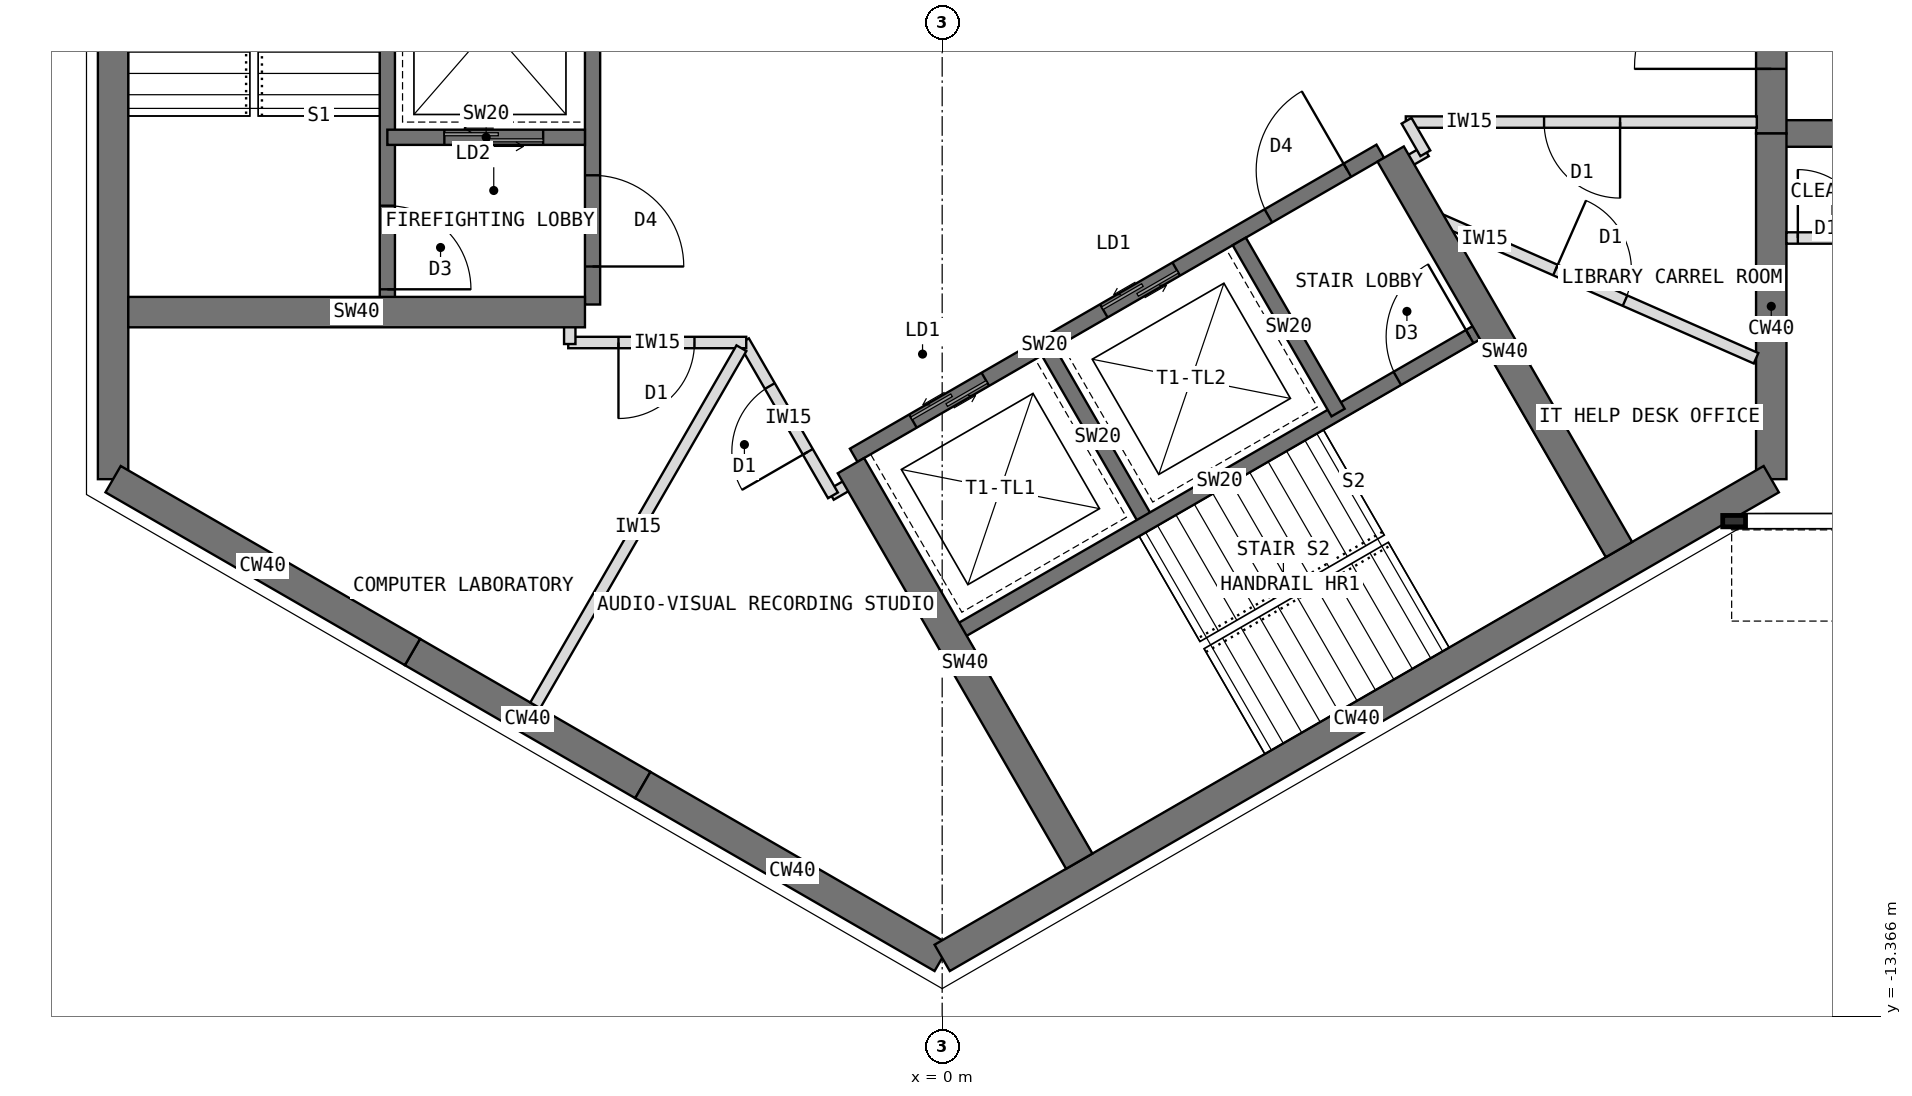
"""IFC4 building model, lengths in metres.
Left out: names, types, materials, properties, quantities, classifications, styles, units other than length and angle.
Written with IfcOpenShell. Run it as: python <this file> out.ifc"""

import sys

from ifc_helpers import new_model, si_unit, direction, frame, frame_2d, origin, place, context, subcontext, project, spatial, rectangle, extrude, element, fill, save


model = new_model("IFC4")
c1 = context("Model", 3, precision=1e-05, world=origin(), true_north=direction((0.0, 1.0)))
c2 = subcontext(c1, "Body", "Model", "MODEL_VIEW")
j1 = project(units=[si_unit("LENGTHUNIT", "METRE"), si_unit("PLANEANGLEUNIT", "RADIAN")], contexts=[c1])
p1 = place(None, origin())
s1 = spatial("IfcSite", under=j1, at=p1, CompositionType="ELEMENT")
p2 = place(p1, origin())
s2 = spatial("IfcBuilding", under=s1, at=p2, CompositionType="ELEMENT")
p3 = place(p2, frame((0.0, 0.0, 255.5)))
s3 = spatial("IfcBuildingStorey", under=s2, at=p3, CompositionType="ELEMENT", Elevation=255.5)
p4 = place(p3, frame((10.908, -6.298, 0.0), z_axis=(0.0, 0.0, 1.0), x_axis=(0.0, 1.0, 0.0)))
e1 = element("IfcWall", 1, at=p4, inside=s3, PredefinedType="SHEAR", context=c2, shape_type="SweptSolid", body=[
    extrude(rectangle(XDim=4.548, YDim=0.4, at=frame_2d((2.274, 0.0))), origin(), (0.0, 0.0, 1.0), 4.0),
])
p5 = place(p3, frame((10.908, -1.75, 0.0), z_axis=(0.0, 0.0, 1.0), x_axis=(0.0, 1.0, 0.0)))
e2 = element("IfcWall", 2, at=p5, inside=s3, PredefinedType="SHEAR", context=c2, shape_type="SweptSolid", body=[
    extrude(rectangle(XDim=3.5, YDim=0.4, at=frame_2d((1.75, 0.0))), origin(), (0.0, 0.0, 1.0), 4.0),
])
p6 = place(p5, frame((0.85, 0.0, 0.0)))
e3 = element("IfcOpeningElement", 3, at=p6, cuts=e2, PredefinedType="OPENING", context=c2, shape_type="SweptSolid", body=[
    extrude(rectangle(XDim=1.8, YDim=2.1, at=frame_2d((0.9, 1.05))), frame((0.0, 0.21, 0.0), z_axis=(0.0, -1.0, 0.0), x_axis=(1.0, 0.0, 0.0)), (0.0, 0.0, 1.0), 0.42),
])
p7 = place(p3, frame((-10.908, 6.298, 0.0), z_axis=(0.0, 0.0, 1.0), x_axis=(0.0, -1.0, 0.0)))
e4 = element("IfcWall", 4, at=p7, inside=s3, PredefinedType="SHEAR", context=c2, shape_type="SweptSolid", body=[
    extrude(rectangle(XDim=12.596, YDim=0.4, at=frame_2d((6.298, 0.0))), origin(), (0.0, 0.0, 1.0), 4.0),
])
p8 = place(p3, frame((-10.908, -6.298, 0.0), z_axis=(0.0, 0.0, 1.0), x_axis=(0.866034513004, -0.499984222037, 0.0)))
e5 = element("IfcWall", 5, at=p8, inside=s3, PredefinedType="SHEAR", context=c2, shape_type="SweptSolid", body=[
    extrude(rectangle(XDim=4.548, YDim=0.4, at=frame_2d((2.274, 0.0))), origin(), (0.0, 0.0, 1.0), 4.0),
])
p9 = place(p3, frame((-6.97, -8.572, 0.0), z_axis=(0.0, 0.0, 1.0), x_axis=(0.866019471182, -0.500010275428, 0.0)))
e6 = element("IfcWall", 6, at=p9, inside=s3, PredefinedType="SHEAR", context=c2, shape_type="SweptSolid", body=[
    extrude(rectangle(XDim=3.5, YDim=0.4, at=frame_2d((1.75, 0.0))), origin(), (0.0, 0.0, 1.0), 4.0),
])
p10 = place(p3, frame((-3.939, -10.322, 0.0), z_axis=(0.0, 0.0, 1.0), x_axis=(0.866011268655, -0.500024481964, 0.0)))
e7 = element("IfcWall", 7, at=p10, inside=s3, PredefinedType="SHEAR", context=c2, shape_type="SweptSolid", body=[
    extrude(rectangle(XDim=4.548, YDim=0.4, at=frame_2d((2.274, 0.0))), origin(), (0.0, 0.0, 1.0), 4.0),
])
p11 = place(p3, frame((0.0, -12.596, 0.0), z_axis=(0.0, 0.0, 1.0), x_axis=(0.866021940709, 0.500005998175, 0.0)))
e8 = element("IfcWall", 8, at=p11, inside=s3, PredefinedType="SHEAR", context=c2, shape_type="SweptSolid", body=[
    extrude(rectangle(XDim=12.596, YDim=0.4, at=frame_2d((6.298, 0.0))), origin(), (0.0, 0.0, 1.0), 4.0),
])
p12 = place(p3, frame((10.908, -1.75, 0.0), z_axis=(0.0, 0.0, 1.0), x_axis=(1.0, 0.0, 0.0)))
e9 = element("IfcWall", 9, at=p12, inside=s3, PredefinedType="SHEAR", context=c2, shape_type="SweptSolid", body=[
    extrude(rectangle(XDim=2.592, YDim=0.35, at=frame_2d((1.296, 0.0))), origin(), (0.0, 0.0, 1.0), 4.0),
])
p13 = place(p3, frame((-4.6, 4.0, 0.0), z_axis=(0.0, 0.0, 1.0), x_axis=(0.0, -1.0, 0.0)))
e10 = element("IfcWall", 10, at=p13, inside=s3, PredefinedType="SHEAR", context=c2, shape_type="SweptSolid", body=[
    extrude(rectangle(XDim=8.0, YDim=0.2, at=frame_2d((4.0, 0.0))), origin(), (0.0, 0.0, 1.0), 4.0),
])
p14 = place(p13, frame((6.3, 0.0, 0.0)))
e11 = element("IfcOpeningElement", 11, at=p14, cuts=e10, PredefinedType="OPENING", context=c2, shape_type="SweptSolid", body=[
    extrude(rectangle(XDim=1.2, YDim=2.1, at=frame_2d((0.6, 1.05))), frame((0.0, 0.11, 0.0), z_axis=(0.0, -1.0, 0.0), x_axis=(1.0, 0.0, 0.0)), (0.0, 0.0, 1.0), 0.22),
])
p15 = place(p13, frame((0.9, 0.0, 0.0)))
e12 = element("IfcOpeningElement", 12, at=p15, cuts=e10, PredefinedType="OPENING", context=c2, shape_type="SweptSolid", body=[
    extrude(rectangle(XDim=1.1, YDim=2.2, at=frame_2d((0.55, 1.1))), frame((0.0, 0.11, 0.0), z_axis=(0.0, -1.0, 0.0), x_axis=(1.0, 0.0, 0.0)), (0.0, 0.0, 1.0), 0.22),
])
p16 = place(p3, frame((-4.7, -1.8, 0.0), z_axis=(0.0, 0.0, 1.0), x_axis=(-1.0, 0.0, 0.0)))
e13 = element("IfcWall", 13, at=p16, inside=s3, PredefinedType="SHEAR", context=c2, shape_type="SweptSolid", body=[
    extrude(rectangle(XDim=2.6, YDim=0.2, at=frame_2d((1.3, 0.0))), origin(), (0.0, 0.0, 1.0), 4.0),
])
p17 = place(p16, frame((0.55, 0.0, 0.0)))
e14 = element("IfcOpeningElement", 14, at=p17, cuts=e13, PredefinedType="OPENING", context=c2, shape_type="SweptSolid", body=[
    extrude(rectangle(XDim=1.3, YDim=2.2, at=frame_2d((0.65, 1.1))), frame((0.0, 0.11, 0.0), z_axis=(0.0, -1.0, 0.0), x_axis=(1.0, 0.0, 0.0)), (0.0, 0.0, 1.0), 0.22),
])
p18 = place(p3, frame((-7.3, 4.0, 0.0), z_axis=(0.0, 0.0, 1.0), x_axis=(0.0, -1.0, 0.0)))
e15 = element("IfcWall", 15, at=p18, inside=s3, PredefinedType="SHEAR", context=c2, shape_type="SweptSolid", body=[
    extrude(rectangle(XDim=8.0, YDim=0.2, at=frame_2d((4.0, 0.0))), origin(), (0.0, 0.0, 1.0), 4.0),
])
p19 = place(p18, frame((6.7, 0.0, 0.0)))
e16 = element("IfcOpeningElement", 16, at=p19, cuts=e15, PredefinedType="OPENING", context=c2, shape_type="SweptSolid", body=[
    extrude(rectangle(XDim=1.1, YDim=2.1, at=frame_2d((0.55, 1.05))), frame((0.0, 0.11, 0.0), z_axis=(0.0, -1.0, 0.0), x_axis=(1.0, 0.0, 0.0)), (0.0, 0.0, 1.0), 0.22),
])
p20 = place(p3, frame((-4.7, -4.1, 0.0), z_axis=(0.0, 0.0, 1.0), x_axis=(-1.0, 0.0, 0.0)))
e17 = element("IfcWall", 17, at=p20, inside=s3, PredefinedType="SHEAR", context=c2, shape_type="SweptSolid", body=[
    extrude(rectangle(XDim=6.008, YDim=0.4, at=frame_2d((3.004, 0.0))), origin(), (0.0, 0.0, 1.0), 4.0),
])
p21 = place(p3, frame((-1.164, -5.984, 0.0), z_axis=(0.0, 0.0, 1.0), x_axis=(0.866026010844, 0.49999894854, 0.0)))
e18 = element("IfcWall", 18, at=p21, inside=s3, PredefinedType="SHEAR", context=c2, shape_type="SweptSolid", body=[
    extrude(rectangle(XDim=8.0, YDim=0.2, at=frame_2d((4.0, 0.0))), origin(), (0.0, 0.0, 1.0), 4.0),
])
p22 = place(p21, frame((6.3, 0.0, 0.0)))
e19 = element("IfcOpeningElement", 19, at=p22, cuts=e18, PredefinedType="OPENING", context=c2, shape_type="SweptSolid", body=[
    extrude(rectangle(XDim=1.2, YDim=2.1, at=frame_2d((0.6, 1.05))), frame((0.0, 0.11, 0.0), z_axis=(0.0, -1.0, 0.0), x_axis=(1.0, 0.0, 0.0)), (0.0, 0.0, 1.0), 0.22),
])
p23 = place(p21, frame((0.9, 0.0, 0.0)))
e20 = element("IfcOpeningElement", 20, at=p23, cuts=e18, PredefinedType="OPENING", context=c2, shape_type="SweptSolid", body=[
    extrude(rectangle(XDim=1.1, YDim=2.2, at=frame_2d((0.55, 1.1))), frame((0.0, 0.11, 0.0), z_axis=(0.0, -1.0, 0.0), x_axis=(1.0, 0.0, 0.0)), (0.0, 0.0, 1.0), 0.22),
])
p24 = place(p21, frame((3.8, 0.0, 0.0)))
e21 = element("IfcOpeningElement", 21, at=p24, cuts=e18, PredefinedType="OPENING", context=c2, shape_type="SweptSolid", body=[
    extrude(rectangle(XDim=1.1, YDim=2.2, at=frame_2d((0.55, 1.1))), frame((0.0, 0.11, 0.0), z_axis=(0.0, -1.0, 0.0), x_axis=(1.0, 0.0, 0.0)), (0.0, 0.0, 1.0), 0.22),
])
p25 = place(p3, frame((1.397, -4.62, 0.0), z_axis=(0.0, 0.0, 1.0), x_axis=(0.499936506574, -0.866062058628, 0.0)))
e22 = element("IfcWall", 22, at=p25, inside=s3, PredefinedType="SHEAR", context=c2, shape_type="SweptSolid", body=[
    extrude(rectangle(XDim=2.6, YDim=0.2, at=frame_2d((1.3, 0.0))), origin(), (0.0, 0.0, 1.0), 4.0),
])
p26 = place(p3, frame((3.909, -3.17, 0.0), z_axis=(0.0, 0.0, 1.0), x_axis=(0.49997716683, -0.86603858612, 0.0)))
e23 = element("IfcWall", 23, at=p26, inside=s3, PredefinedType="SHEAR", context=c2, shape_type="SweptSolid", body=[
    extrude(rectangle(XDim=2.6, YDim=0.2, at=frame_2d((1.3, 0.0))), origin(), (0.0, 0.0, 1.0), 4.0),
])
p27 = place(p3, frame((0.186, -8.322, 0.0), z_axis=(0.0, 0.0, 1.0), x_axis=(0.866026010844, 0.49999894854, 0.0)))
e24 = element("IfcWall", 24, at=p27, inside=s3, PredefinedType="SHEAR", context=c2, shape_type="SweptSolid", body=[
    extrude(rectangle(XDim=8.0, YDim=0.2, at=frame_2d((4.0, 0.0))), origin(), (0.0, 0.0, 1.0), 4.0),
])
p28 = place(p27, frame((6.7, 0.0, 0.0)))
e25 = element("IfcOpeningElement", 25, at=p28, cuts=e24, PredefinedType="OPENING", context=c2, shape_type="SweptSolid", body=[
    extrude(rectangle(XDim=1.1, YDim=2.1, at=frame_2d((0.55, 1.05))), frame((0.0, 0.11, 0.0), z_axis=(0.0, -1.0, 0.0), x_axis=(1.0, 0.0, 0.0)), (0.0, 0.0, 1.0), 0.22),
])
for number, where, z_axis, x_axis in (
    (26, (5.901, -2.02, 0.0), (0.0, 0.0, 1.0), (0.5, -0.866, 0.0)),
    (27, (-1.201, -6.12, 0.0), (0.0, 0.0, 1.0), (0.5, -0.866, 0.0)),
):
    element("IfcWall", number, at=place(p3, frame(where, z_axis=z_axis, x_axis=x_axis)), inside=s3, PredefinedType="SHEAR", context=c2, shape_type="SweptSolid", body=[
        extrude(rectangle(XDim=6.008, YDim=0.4, at=frame_2d((3.004, 0.0))), origin(), (0.0, 0.0, 1.0), 4.0),
    ])
p29 = place(p3, frame((11.108, -3.125, 0.0), z_axis=(0.0, 0.0, 1.0), x_axis=(1.0, 0.0, 0.0)))
e28 = element("IfcWall", 28, at=p29, inside=s3, PredefinedType="PARTITIONING", context=c2, shape_type="SweptSolid", body=[
    extrude(rectangle(XDim=2.4, YDim=0.15, at=frame_2d((1.2, 0.0))), origin(), (0.0, 0.0, 1.0), 3.8),
])
p30 = place(p29, frame((0.15, 0.0, 0.0)))
e29 = element("IfcOpeningElement", 29, at=p30, cuts=e28, PredefinedType="OPENING", context=c2, shape_type="SweptSolid", body=[
    extrude(rectangle(XDim=0.9, YDim=2.1, at=frame_2d((0.45, 1.05))), frame((0.0, 0.085, 0.0), z_axis=(0.0, -1.0, 0.0), x_axis=(1.0, 0.0, 0.0)), (0.0, 0.0, 1.0), 0.17),
])
for number, where, z_axis, x_axis in (
    (30, (6.365, -1.983, 0.0), (0.0, 0.0, 1.0), (-0.866, -0.5, 0.0)),
    (31, (-1.092, -6.289, 0.0), (0.0, 0.0, 1.0), (-0.866, -0.5, 0.0)),
):
    element("IfcWall", number, at=place(p3, frame(where, z_axis=z_axis, x_axis=x_axis)), inside=s3, PredefinedType="PARTITIONING", context=c2, shape_type="SweptSolid", body=[
        extrude(rectangle(XDim=0.43, YDim=0.15, at=frame_2d((0.215, 0.0))), origin(), (0.0, 0.0, 1.0), 3.8),
    ])
p31 = place(p3, frame((-1.437, -6.511, 0.0), z_axis=(0.0, 0.0, 1.0), x_axis=(-0.500074377092, 0.865982457891, 0.0)))
e32 = element("IfcWall", 32, at=p31, inside=s3, PredefinedType="PARTITIONING", context=c2, shape_type="SweptSolid", body=[
    extrude(rectangle(XDim=2.342, YDim=0.15, at=frame_2d((1.171, 0.0))), origin(), (0.0, 0.0, 1.0), 3.8),
])
p32 = place(p31, frame((0.661, 0.0, 0.0)))
e33 = element("IfcOpeningElement", 33, at=p32, cuts=e32, PredefinedType="OPENING", context=c2, shape_type="SweptSolid", body=[
    extrude(rectangle(XDim=1.0, YDim=2.1, at=frame_2d((0.5, 1.05))), frame((0.0, 0.085, 0.0), z_axis=(0.0, -1.0, 0.0), x_axis=(1.0, 0.0, 0.0)), (0.0, 0.0, 1.0), 0.17),
])
p33 = place(p3, frame((-2.578, -4.5, 0.0), z_axis=(0.0, 0.0, 1.0), x_axis=(-1.0, 0.0, 0.0)))
e34 = element("IfcWall", 34, at=p33, inside=s3, PredefinedType="PARTITIONING", context=c2, shape_type="SweptSolid", body=[
    extrude(rectangle(XDim=2.342, YDim=0.15, at=frame_2d((1.171, 0.0))), origin(), (0.0, 0.0, 1.0), 3.8),
])
p34 = place(p33, frame((0.681, 0.0, 0.0)))
e35 = element("IfcOpeningElement", 35, at=p34, cuts=e34, PredefinedType="OPENING", context=c2, shape_type="SweptSolid", body=[
    extrude(rectangle(XDim=1.0, YDim=2.1, at=frame_2d((0.5, 1.05))), frame((0.0, 0.085, 0.0), z_axis=(0.0, -1.0, 0.0), x_axis=(1.0, 0.0, 0.0)), (0.0, 0.0, 1.0), 0.17),
])
p35 = place(p3, frame((-4.9, -4.52, 0.0), z_axis=(0.0, 0.0, 1.0), x_axis=(0.0, 1.0, 0.0)))
e36 = element("IfcWall", 36, at=p35, inside=s3, PredefinedType="PARTITIONING", context=c2, shape_type="SweptSolid", body=[
    extrude(rectangle(XDim=0.43, YDim=0.15, at=frame_2d((0.215, 0.0))), origin(), (0.0, 0.0, 1.0), 3.8),
])
p36 = place(p3, frame((10.718, -1.6, 0.0), z_axis=(0.0, 0.0, 1.0), x_axis=(-1.0, 0.0, 0.0)))
e37 = element("IfcWall", 37, at=p36, inside=s3, PredefinedType="PARTITIONING", context=c2, shape_type="SweptSolid", body=[
    extrude(rectangle(XDim=4.618, YDim=0.15, at=frame_2d((2.309, 0.0))), origin(), (0.0, 0.0, 1.0), 3.8),
])
p37 = place(p36, frame((1.799, 0.0, 0.0)))
e38 = element("IfcOpeningElement", 38, at=p37, cuts=e37, PredefinedType="OPENING", context=c2, shape_type="SweptSolid", body=[
    extrude(rectangle(XDim=1.0, YDim=2.1, at=frame_2d((0.5, 1.05))), frame((0.0, 0.085, 0.0), z_axis=(0.0, -1.0, 0.0), x_axis=(1.0, 0.0, 0.0)), (0.0, 0.0, 1.0), 0.17),
])
p38 = place(p3, frame((6.11, -1.583, 0.0), z_axis=(0.0, 0.0, 1.0), x_axis=(0.50033519877, -0.865831790172, 0.0)))
e39 = element("IfcWall", 39, at=p38, inside=s3, PredefinedType="PARTITIONING", context=c2, shape_type="SweptSolid", body=[
    extrude(rectangle(XDim=0.494, YDim=0.15, at=frame_2d((0.247, 0.0))), origin(), (0.0, 0.0, 1.0), 3.8),
])
p39 = place(p3, frame((-2.641, -4.575, 0.0), z_axis=(0.0, 0.0, 1.0), x_axis=(-0.500010688608, -0.866019232626, 0.0)))
e40 = element("IfcWall", 40, at=p39, inside=s3, PredefinedType="PARTITIONING", context=c2, shape_type="SweptSolid", body=[
    extrude(rectangle(XDim=5.426, YDim=0.15, at=frame_2d((2.713, 0.0))), origin(), (0.0, 0.0, 1.0), 3.8),
])
p40 = place(p3, frame((6.344, -2.789, 0.0), z_axis=(0.0, 0.0, 1.0), x_axis=(0.915438841787, -0.402457111937, 0.0)))
e41 = element("IfcWall", 41, at=p40, inside=s3, PredefinedType="PARTITIONING", context=c2, shape_type="SweptSolid", body=[
    extrude(rectangle(XDim=4.767, YDim=0.15, at=frame_2d((2.383, 0.0))), origin(), (0.0, 0.0, 1.0), 3.8),
])
p41 = place(p40, frame((1.883, 0.0, 0.0)))
e42 = element("IfcOpeningElement", 42, at=p41, cuts=e41, PredefinedType="OPENING", context=c2, shape_type="SweptSolid", body=[
    extrude(rectangle(XDim=1.0, YDim=2.1, at=frame_2d((0.5, 1.05))), frame((0.0, 0.085, 0.0), z_axis=(0.0, -1.0, 0.0), x_axis=(1.0, 0.0, 0.0)), (0.0, 0.0, 1.0), 0.17),
])
p42 = place(p14, origin())
e43 = element("IfcDoor", 43, at=p42, inside=s3, OperationType="SINGLE_SWING_RIGHT", PredefinedType="DOOR", context=c2, shape_type="SweptSolid", body=[
    extrude(rectangle(XDim=1.2, YDim=2.1, at=frame_2d((0.6, 1.05))), frame((0.0, 0.025, 0.0), z_axis=(0.0, -1.0, 0.0), x_axis=(1.0, 0.0, 0.0)), (0.0, 0.0, 1.0), 0.05),
])
fill(e11, e43)
p43 = place(p17, origin())
e44 = element("IfcDoor", 44, at=p43, inside=s3, OperationType="DOUBLE_DOOR_SLIDING", PredefinedType="DOOR", context=c2, shape_type="SweptSolid", body=[
    extrude(rectangle(XDim=1.3, YDim=2.2, at=frame_2d((0.65, 1.1))), frame((0.0, 0.025, 0.0), z_axis=(0.0, -1.0, 0.0), x_axis=(1.0, 0.0, 0.0)), (0.0, 0.0, 1.0), 0.05),
])
fill(e14, e44)
p44 = place(p19, origin())
e45 = element("IfcDoor", 45, at=p44, inside=s3, OperationType="SINGLE_SWING_RIGHT", PredefinedType="DOOR", context=c2, shape_type="SweptSolid", body=[
    extrude(rectangle(XDim=1.1, YDim=2.1, at=frame_2d((0.55, 1.05))), frame((0.0, 0.025, 0.0), z_axis=(0.0, -1.0, 0.0), x_axis=(1.0, 0.0, 0.0)), (0.0, 0.0, 1.0), 0.05),
])
fill(e16, e45)
p45 = place(p22, origin())
e46 = element("IfcDoor", 46, at=p45, inside=s3, OperationType="SINGLE_SWING_RIGHT", PredefinedType="DOOR", context=c2, shape_type="SweptSolid", body=[
    extrude(rectangle(XDim=1.2, YDim=2.1, at=frame_2d((0.6, 1.05))), frame((0.0, 0.025, 0.0), z_axis=(0.0, -1.0, 0.0), x_axis=(1.0, 0.0, 0.0)), (0.0, 0.0, 1.0), 0.05),
])
fill(e19, e46)
p46 = place(p23, origin())
e47 = element("IfcDoor", 47, at=p46, inside=s3, OperationType="DOUBLE_DOOR_SLIDING", PredefinedType="DOOR", context=c2, shape_type="SweptSolid", body=[
    extrude(rectangle(XDim=1.1, YDim=2.2, at=frame_2d((0.55, 1.1))), frame((0.0, 0.025, 0.0), z_axis=(0.0, -1.0, 0.0), x_axis=(1.0, 0.0, 0.0)), (0.0, 0.0, 1.0), 0.05),
])
fill(e20, e47)
p47 = place(p24, origin())
e48 = element("IfcDoor", 48, at=p47, inside=s3, OperationType="DOUBLE_DOOR_SLIDING", PredefinedType="DOOR", context=c2, shape_type="SweptSolid", body=[
    extrude(rectangle(XDim=1.1, YDim=2.2, at=frame_2d((0.55, 1.1))), frame((0.0, 0.025, 0.0), z_axis=(0.0, -1.0, 0.0), x_axis=(1.0, 0.0, 0.0)), (0.0, 0.0, 1.0), 0.05),
])
fill(e21, e48)
p48 = place(p28, origin())
e49 = element("IfcDoor", 49, at=p48, inside=s3, OperationType="SINGLE_SWING_RIGHT", PredefinedType="DOOR", context=c2, shape_type="SweptSolid", body=[
    extrude(rectangle(XDim=1.1, YDim=2.1, at=frame_2d((0.55, 1.05))), frame((0.0, 0.025, 0.0), z_axis=(0.0, -1.0, 0.0), x_axis=(1.0, 0.0, 0.0)), (0.0, 0.0, 1.0), 0.05),
])
fill(e25, e49)
p49 = place(p6, origin())
e50 = element("IfcDoor", 50, at=p49, inside=s3, OperationType="DOUBLE_DOOR_DOUBLE_SWING", PredefinedType="DOOR", context=c2, shape_type="SweptSolid", body=[
    extrude(rectangle(XDim=1.8, YDim=2.1, at=frame_2d((0.9, 1.05))), frame((0.0, 0.025, 0.0), z_axis=(0.0, -1.0, 0.0), x_axis=(1.0, 0.0, 0.0)), (0.0, 0.0, 1.0), 0.05),
])
fill(e3, e50)
p50 = place(p30, origin())
e51 = element("IfcDoor", 51, at=p50, inside=s3, OperationType="SINGLE_SWING_LEFT", PredefinedType="DOOR", context=c2, shape_type="SweptSolid", body=[
    extrude(rectangle(XDim=0.9, YDim=2.1, at=frame_2d((0.45, 1.05))), frame((0.0, 0.025, 0.0), z_axis=(0.0, -1.0, 0.0), x_axis=(1.0, 0.0, 0.0)), (0.0, 0.0, 1.0), 0.05),
])
fill(e29, e51)
p51 = place(p34, origin())
e52 = element("IfcDoor", 52, at=p51, inside=s3, OperationType="SINGLE_SWING_RIGHT", PredefinedType="DOOR", context=c2, shape_type="SweptSolid", body=[
    extrude(rectangle(XDim=1.0, YDim=2.1, at=frame_2d((0.5, 1.05))), frame((0.0, 0.025, 0.0), z_axis=(0.0, -1.0, 0.0), x_axis=(1.0, 0.0, 0.0)), (0.0, 0.0, 1.0), 0.05),
])
fill(e35, e52)
p52 = place(p32, origin())
e53 = element("IfcDoor", 53, at=p52, inside=s3, OperationType="SINGLE_SWING_LEFT", PredefinedType="DOOR", context=c2, shape_type="SweptSolid", body=[
    extrude(rectangle(XDim=1.0, YDim=2.1, at=frame_2d((0.5, 1.05))), frame((0.0, 0.025, 0.0), z_axis=(0.0, -1.0, 0.0), x_axis=(1.0, 0.0, 0.0)), (0.0, 0.0, 1.0), 0.05),
])
fill(e33, e53)
p53 = place(p37, origin())
e54 = element("IfcDoor", 54, at=p53, inside=s3, OperationType="SINGLE_SWING_LEFT", PredefinedType="DOOR", context=c2, shape_type="SweptSolid", body=[
    extrude(rectangle(XDim=1.0, YDim=2.1, at=frame_2d((0.5, 1.05))), frame((0.0, 0.025, 0.0), z_axis=(0.0, -1.0, 0.0), x_axis=(1.0, 0.0, 0.0)), (0.0, 0.0, 1.0), 0.05),
])
fill(e38, e54)
p54 = place(p41, origin())
e55 = element("IfcDoor", 55, at=p54, inside=s3, OperationType="SINGLE_SWING_LEFT", PredefinedType="DOOR", context=c2, shape_type="SweptSolid", body=[
    extrude(rectangle(XDim=1.0, YDim=2.1, at=frame_2d((0.5, 1.05))), frame((0.0, 0.025, 0.0), z_axis=(0.0, -1.0, 0.0), x_axis=(1.0, 0.0, 0.0)), (0.0, 0.0, 1.0), 0.05),
])
fill(e42, e55)
save(model, sys.argv[1])
